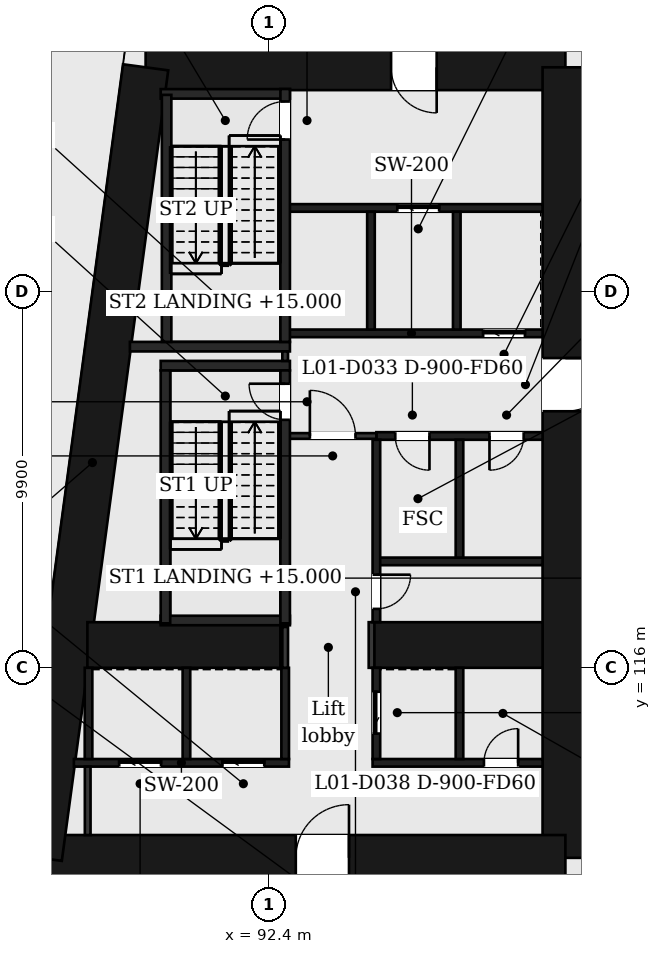
"""IFC4 building model, lengths in metres.
Left out: names, types, materials, properties, quantities, classifications, styles, units other than length and angle.
Written with IfcOpenShell. Run it as: python <this file> out.ifc"""

import sys

from ifc_helpers import new_model, si_unit, direction, frame, frame_2d, origin, place, context, subcontext, project, spatial, rectangle, extrude, element, fill, save


model = new_model("IFC4")
c1 = context("Model", 3, precision=1e-05, world=origin(), true_north=direction((0.0, 1.0)))
c2 = subcontext(c1, "Body", "Model", "MODEL_VIEW")
j1 = project(units=[si_unit("LENGTHUNIT", "METRE"), si_unit("PLANEANGLEUNIT", "RADIAN")], contexts=[c1])
p1 = place(None, origin())
s1 = spatial("IfcSite", under=j1, at=p1, CompositionType="ELEMENT")
p2 = place(p1, origin())
s2 = spatial("IfcBuilding", under=s1, at=p2, CompositionType="ELEMENT")
p3 = place(p2, frame((0.0, 0.0, 9.0)))
s3 = spatial("IfcBuildingStorey", under=s2, at=p3, CompositionType="ELEMENT", Elevation=9.0)
p4 = place(p3, frame((89.156, 131.8, 0.0), z_axis=(0.0, 0.0, 1.0), x_axis=(1.0, 0.0, 0.0)))
e1 = element("IfcWall", 1, at=p4, inside=s3, PredefinedType="SHEAR", context=c2, shape_type="SweptSolid", body=[
    extrude(rectangle(XDim=11.044, YDim=1.2, at=frame_2d((5.522, 0.0))), origin(), (0.0, 0.0, 1.0), 8.0),
])
p5 = place(p4, frame((6.458, 0.0, 0.0)))
e2 = element("IfcOpeningElement", 2, at=p5, cuts=e1, PredefinedType="OPENING", context=c2, shape_type="SweptSolid", body=[
    extrude(rectangle(XDim=1.2, YDim=2.1, at=frame_2d((0.6, 1.05))), frame((0.0, 0.61, 0.0), z_axis=(0.0, -1.0, 0.0), x_axis=(1.0, 0.0, 0.0)), (0.0, 0.0, 1.0), 1.22),
])
p6 = place(p3, frame((100.2, 131.8, 0.0), z_axis=(0.0, 0.0, 1.0), x_axis=(0.0, -1.0, 0.0)))
e3 = element("IfcWall", 3, at=p6, inside=s3, PredefinedType="SHEAR", context=c2, shape_type="SweptSolid", body=[
    extrude(rectangle(XDim=20.8, YDim=1.2, at=frame_2d((10.4, 0.0))), origin(), (0.0, 0.0, 1.0), 8.0),
])
p7 = place(p6, frame((7.65, 0.0, 0.0)))
e4 = element("IfcOpeningElement", 4, at=p7, cuts=e3, PredefinedType="OPENING", context=c2, shape_type="SweptSolid", body=[
    extrude(rectangle(XDim=1.4, YDim=2.1, at=frame_2d((0.7, 1.05))), frame((0.0, 0.61, 0.0), z_axis=(0.0, -1.0, 0.0), x_axis=(1.0, 0.0, 0.0)), (0.0, 0.0, 1.0), 1.22),
])
p8 = place(p3, frame((100.2, 111.0, 0.0), z_axis=(0.0, 0.0, 1.0), x_axis=(-1.0, 0.0, 0.0)))
e5 = element("IfcWall", 5, at=p8, inside=s3, PredefinedType="SHEAR", context=c2, shape_type="SweptSolid", body=[
    extrude(rectangle(XDim=13.844, YDim=1.2, at=frame_2d((6.922, 0.0))), origin(), (0.0, 0.0, 1.0), 8.0),
])
p9 = place(p8, frame((5.694, 0.0, 0.0)))
e6 = element("IfcOpeningElement", 6, at=p9, cuts=e5, PredefinedType="OPENING", context=c2, shape_type="SweptSolid", body=[
    extrude(rectangle(XDim=1.4, YDim=2.1, at=frame_2d((0.7, 1.05))), frame((0.0, 0.61, 0.0), z_axis=(0.0, -1.0, 0.0), x_axis=(1.0, 0.0, 0.0)), (0.0, 0.0, 1.0), 1.22),
])
p10 = place(p3, frame((86.355, 111.0, 0.0), z_axis=(0.0, 0.0, 1.0), x_axis=(0.133413989637, 0.99106039542, 0.0)))
e7 = element("IfcWall", 7, at=p10, inside=s3, PredefinedType="SHEAR", context=c2, shape_type="SweptSolid", body=[
    extrude(rectangle(XDim=20.988, YDim=1.2, at=frame_2d((10.494, 0.0))), origin(), (0.0, 0.0, 1.0), 8.0),
])
p11 = place(p3, frame((87.623, 116.6, 0.0), z_axis=(0.0, 0.0, 1.0), x_axis=(1.0, 0.0, 0.0)))
e8 = element("IfcWall", 8, at=p11, inside=s3, PredefinedType="SHEAR", context=c2, shape_type="SweptSolid", body=[
    extrude(rectangle(XDim=5.077, YDim=1.2, at=frame_2d((2.539, 0.0))), origin(), (0.0, 0.0, 1.0), 8.0),
])
p12 = place(p3, frame((95.1, 116.6, 0.0), z_axis=(0.0, 0.0, 1.0), x_axis=(1.0, 0.0, 0.0)))
e9 = element("IfcWall", 9, at=p12, inside=s3, PredefinedType="SHEAR", context=c2, shape_type="SweptSolid", body=[
    extrude(rectangle(XDim=4.5, YDim=1.2, at=frame_2d((2.25, 0.0))), origin(), (0.0, 0.0, 1.0), 8.0),
])
p13 = place(p3, frame((87.267, 113.5, 0.0), z_axis=(0.0, 0.0, 1.0), x_axis=(1.0, 0.0, 0.0)))
e10 = element("IfcWall", 10, at=p13, inside=s3, PredefinedType="PARTITIONING", context=c2, shape_type="SweptSolid", body=[
    extrude(rectangle(XDim=5.66, YDim=0.2, at=frame_2d((2.83, 0.0))), origin(), (0.0, 0.0, 1.0), 7.5),
])
p14 = place(p13, frame((1.193, 0.0, 0.0)))
e11 = element("IfcOpeningElement", 11, at=p14, cuts=e10, PredefinedType="OPENING", context=c2, shape_type="SweptSolid", body=[
    extrude(rectangle(XDim=1.1, YDim=2.1, at=frame_2d((0.55, 1.05))), frame((0.0, 0.11, 0.0), z_axis=(0.0, -1.0, 0.0), x_axis=(1.0, 0.0, 0.0)), (0.0, 0.0, 1.0), 0.22),
])
p15 = place(p13, frame((3.91, 0.0, 0.0)))
e12 = element("IfcOpeningElement", 12, at=p15, cuts=e10, PredefinedType="OPENING", context=c2, shape_type="SweptSolid", body=[
    extrude(rectangle(XDim=1.1, YDim=2.1, at=frame_2d((0.55, 1.05))), frame((0.0, 0.11, 0.0), z_axis=(0.0, -1.0, 0.0), x_axis=(1.0, 0.0, 0.0)), (0.0, 0.0, 1.0), 0.22),
])
p16 = place(p3, frame((95.127, 113.5, 0.0), z_axis=(0.0, 0.0, 1.0), x_axis=(1.0, 0.0, 0.0)))
e13 = element("IfcWall", 13, at=p16, inside=s3, PredefinedType="PARTITIONING", context=c2, shape_type="SweptSolid", body=[
    extrude(rectangle(XDim=4.473, YDim=0.2, at=frame_2d((2.237, 0.0))), origin(), (0.0, 0.0, 1.0), 7.5),
])
p17 = place(p16, frame((2.93, 0.0, 0.0)))
e14 = element("IfcOpeningElement", 14, at=p17, cuts=e13, PredefinedType="OPENING", context=c2, shape_type="SweptSolid", body=[
    extrude(rectangle(XDim=0.9, YDim=2.1, at=frame_2d((0.45, 1.05))), frame((0.0, 0.11, 0.0), z_axis=(0.0, -1.0, 0.0), x_axis=(1.0, 0.0, 0.0)), (0.0, 0.0, 1.0), 0.22),
])
p18 = place(p3, frame((89.552, 117.245, 0.0), z_axis=(0.0, 0.0, 1.0), x_axis=(1.0, 0.0, 0.0)))
e15 = element("IfcWall", 15, at=p18, inside=s3, PredefinedType="PARTITIONING", context=c2, shape_type="SweptSolid", body=[
    extrude(rectangle(XDim=3.4, YDim=0.25, at=frame_2d((1.7, 0.0))), origin(), (0.0, 0.0, 1.0), 7.5),
])
p19 = place(p3, frame((95.227, 118.8, 0.0), z_axis=(0.0, 0.0, 1.0), x_axis=(1.0, 0.0, 0.0)))
e16 = element("IfcWall", 16, at=p19, inside=s3, PredefinedType="PARTITIONING", context=c2, shape_type="SweptSolid", body=[
    extrude(rectangle(XDim=4.373, YDim=0.2, at=frame_2d((2.187, 0.0))), origin(), (0.0, 0.0, 1.0), 7.5),
])
p20 = place(p3, frame((95.227, 122.1, 0.0), z_axis=(0.0, 0.0, 1.0), x_axis=(1.0, 0.0, 0.0)))
e17 = element("IfcWall", 17, at=p20, inside=s3, PredefinedType="PARTITIONING", context=c2, shape_type="SweptSolid", body=[
    extrude(rectangle(XDim=4.373, YDim=0.2, at=frame_2d((2.187, 0.0))), origin(), (0.0, 0.0, 1.0), 7.5),
])
p21 = place(p20, frame((0.497, 0.0, 0.0)))
e18 = element("IfcOpeningElement", 18, at=p21, cuts=e17, PredefinedType="OPENING", context=c2, shape_type="SweptSolid", body=[
    extrude(rectangle(XDim=0.9, YDim=2.1, at=frame_2d((0.45, 1.05))), frame((0.0, 0.11, 0.0), z_axis=(0.0, -1.0, 0.0), x_axis=(1.0, 0.0, 0.0)), (0.0, 0.0, 1.0), 0.22),
])
p22 = place(p20, frame((2.976, 0.0, 0.0)))
e19 = element("IfcOpeningElement", 19, at=p22, cuts=e17, PredefinedType="OPENING", context=c2, shape_type="SweptSolid", body=[
    extrude(rectangle(XDim=0.9, YDim=2.1, at=frame_2d((0.45, 1.05))), frame((0.0, 0.11, 0.0), z_axis=(0.0, -1.0, 0.0), x_axis=(1.0, 0.0, 0.0)), (0.0, 0.0, 1.0), 0.22),
])
p23 = place(p3, frame((92.827, 122.1, 0.0), z_axis=(0.0, 0.0, 1.0), x_axis=(1.0, 0.0, 0.0)))
e20 = element("IfcWall", 20, at=p23, inside=s3, PredefinedType="PARTITIONING", context=c2, shape_type="SweptSolid", body=[
    extrude(rectangle(XDim=2.4, YDim=0.15, at=frame_2d((1.2, 0.0))), origin(), (0.0, 0.0, 1.0), 7.5),
])
p24 = place(p23, frame((0.65, 0.0, 0.0)))
e21 = element("IfcOpeningElement", 21, at=p24, cuts=e20, PredefinedType="OPENING", context=c2, shape_type="SweptSolid", body=[
    extrude(rectangle(XDim=1.2, YDim=2.1, at=frame_2d((0.6, 1.05))), frame((0.0, 0.085, 0.0), z_axis=(0.0, -1.0, 0.0), x_axis=(1.0, 0.0, 0.0)), (0.0, 0.0, 1.0), 0.17),
])
p25 = place(p3, frame((89.552, 123.95, 0.0), z_axis=(0.0, 0.0, 1.0), x_axis=(1.0, 0.0, 0.0)))
e22 = element("IfcWall", 22, at=p25, inside=s3, PredefinedType="PARTITIONING", context=c2, shape_type="SweptSolid", body=[
    extrude(rectangle(XDim=3.4, YDim=0.25, at=frame_2d((1.7, 0.0))), origin(), (0.0, 0.0, 1.0), 7.5),
])
p26 = place(p3, frame((88.741, 124.45, 0.0), z_axis=(0.0, 0.0, 1.0), x_axis=(1.0, 0.0, 0.0)))
e23 = element("IfcWall", 23, at=p26, inside=s3, PredefinedType="PARTITIONING", context=c2, shape_type="SweptSolid", body=[
    extrude(rectangle(XDim=4.21, YDim=0.25, at=frame_2d((2.105, 0.0))), origin(), (0.0, 0.0, 1.0), 7.5),
])
p27 = place(p3, frame((92.702, 124.8, 0.0), z_axis=(0.0, 0.0, 1.0), x_axis=(1.0, 0.0, 0.0)))
e24 = element("IfcWall", 24, at=p27, inside=s3, PredefinedType="PARTITIONING", context=c2, shape_type="SweptSolid", body=[
    extrude(rectangle(XDim=6.898, YDim=0.2, at=frame_2d((3.449, 0.0))), origin(), (0.0, 0.0, 1.0), 7.5),
])
p28 = place(p27, frame((5.334, 0.0, 0.0)))
e25 = element("IfcOpeningElement", 25, at=p28, cuts=e24, PredefinedType="OPENING", context=c2, shape_type="SweptSolid", body=[
    extrude(rectangle(XDim=1.1, YDim=2.1, at=frame_2d((0.55, 1.05))), frame((0.0, 0.11, 0.0), z_axis=(0.0, -1.0, 0.0), x_axis=(1.0, 0.0, 0.0)), (0.0, 0.0, 1.0), 0.22),
])
p29 = place(p3, frame((92.827, 128.1, 0.0), z_axis=(0.0, 0.0, 1.0), x_axis=(1.0, 0.0, 0.0)))
e26 = element("IfcWall", 26, at=p29, inside=s3, PredefinedType="PARTITIONING", context=c2, shape_type="SweptSolid", body=[
    extrude(rectangle(XDim=6.773, YDim=0.2, at=frame_2d((3.387, 0.0))), origin(), (0.0, 0.0, 1.0), 7.5),
])
p30 = place(p29, frame((2.951, 0.0, 0.0)))
e27 = element("IfcOpeningElement", 27, at=p30, cuts=e26, PredefinedType="OPENING", context=c2, shape_type="SweptSolid", body=[
    extrude(rectangle(XDim=1.1, YDim=2.1, at=frame_2d((0.55, 1.05))), frame((0.0, 0.11, 0.0), z_axis=(0.0, -1.0, 0.0), x_axis=(1.0, 0.0, 0.0)), (0.0, 0.0, 1.0), 0.22),
])
p31 = place(p3, frame((89.552, 131.101, 0.0), z_axis=(0.0, 0.0, 1.0), x_axis=(1.0, 0.0, 0.0)))
e28 = element("IfcWall", 28, at=p31, inside=s3, PredefinedType="PARTITIONING", context=c2, shape_type="SweptSolid", body=[
    extrude(rectangle(XDim=3.4, YDim=0.25, at=frame_2d((1.7, 0.0))), origin(), (0.0, 0.0, 1.0), 7.5),
])
p32 = place(p3, frame((87.653, 113.6, 0.0), z_axis=(0.0, 0.0, 1.0), x_axis=(0.0, 1.0, 0.0)))
e29 = element("IfcWall", 29, at=p32, inside=s3, PredefinedType="PARTITIONING", context=c2, shape_type="SweptSolid", body=[
    extrude(rectangle(XDim=2.4, YDim=0.2, at=frame_2d((1.2, 0.0))), origin(), (0.0, 0.0, 1.0), 7.5),
])
p33 = place(p3, frame((87.631, 111.6, 0.0), z_axis=(0.0, 0.0, 1.0), x_axis=(0.0, 1.0, 0.0)))
e30 = element("IfcWall", 30, at=p33, inside=s3, PredefinedType="PARTITIONING", context=c2, shape_type="SweptSolid", body=[
    extrude(rectangle(XDim=1.8, YDim=0.15, at=frame_2d((0.9, 0.0))), origin(), (0.0, 0.0, 1.0), 7.5),
])
p34 = place(p3, frame((89.677, 117.17, 0.0), z_axis=(0.0, 0.0, 1.0), x_axis=(0.0, 1.0, 0.0)))
e31 = element("IfcWall", 31, at=p34, inside=s3, PredefinedType="PARTITIONING", context=c2, shape_type="SweptSolid", body=[
    extrude(rectangle(XDim=6.655, YDim=0.25, at=frame_2d((3.328, 0.0))), origin(), (0.0, 0.0, 1.0), 7.5),
])
p35 = place(p3, frame((89.707, 124.575, 0.0), z_axis=(0.0, 0.0, 1.0), x_axis=(0.0, 1.0, 0.0)))
e32 = element("IfcWall", 32, at=p35, inside=s3, PredefinedType="PARTITIONING", context=c2, shape_type="SweptSolid", body=[
    extrude(rectangle(XDim=6.5, YDim=0.25, at=frame_2d((3.25, 0.0))), origin(), (0.0, 0.0, 1.0), 7.5),
])
for number, where, z_axis, x_axis in (
    (33, (90.229, 113.6, 0.0), (0.0, 0.0, 1.0), (0.0, 1.0, 0.0)),
    (34, (92.827, 113.6, 0.0), (0.0, 0.0, 1.0), (0.0, 1.0, 0.0)),
):
    element("IfcWall", number, at=place(p3, frame(where, z_axis=z_axis, x_axis=x_axis)), inside=s3, PredefinedType="PARTITIONING", context=c2, shape_type="SweptSolid", body=[
        extrude(rectangle(XDim=2.4, YDim=0.2, at=frame_2d((1.2, 0.0))), origin(), (0.0, 0.0, 1.0), 7.5),
    ])
p36 = place(p3, frame((92.827, 116.0, 0.0), z_axis=(0.0, 0.0, 1.0), x_axis=(0.0, 1.0, 0.0)))
e35 = element("IfcWall", 35, at=p36, inside=s3, PredefinedType="PARTITIONING", context=c2, shape_type="SweptSolid", body=[
    extrude(rectangle(XDim=1.075, YDim=0.15, at=frame_2d((0.538, 0.0))), origin(), (0.0, 0.0, 1.0), 7.5),
])
p37 = place(p3, frame((92.827, 124.075, 0.0), z_axis=(0.0, 0.0, 1.0), x_axis=(0.0, 1.0, 0.0)))
e36 = element("IfcWall", 36, at=p37, inside=s3, PredefinedType="PARTITIONING", context=c2, shape_type="SweptSolid", body=[
    extrude(rectangle(XDim=0.25, YDim=0.15, at=frame_2d((0.125, 0.0))), origin(), (0.0, 0.0, 1.0), 7.5),
])
p38 = place(p3, frame((92.827, 117.17, 0.0), z_axis=(0.0, 0.0, 1.0), x_axis=(0.0, 1.0, 0.0)))
e37 = element("IfcWall", 37, at=p38, inside=s3, PredefinedType="PARTITIONING", context=c2, shape_type="SweptSolid", body=[
    extrude(rectangle(XDim=6.655, YDim=0.25, at=frame_2d((3.328, 0.0))), origin(), (0.0, 0.0, 1.0), 7.5),
])
p39 = place(p38, frame((5.355, 0.0, 0.0)))
e38 = element("IfcOpeningElement", 38, at=p39, cuts=e37, PredefinedType="OPENING", context=c2, shape_type="SweptSolid", body=[
    extrude(rectangle(XDim=0.95, YDim=2.1, at=frame_2d((0.475, 1.05))), frame((0.0, 0.135, 0.0), z_axis=(0.0, -1.0, 0.0), x_axis=(1.0, 0.0, 0.0)), (0.0, 0.0, 1.0), 0.27),
])
p40 = place(p3, frame((92.827, 124.575, 0.0), z_axis=(0.0, 0.0, 1.0), x_axis=(0.0, 1.0, 0.0)))
e39 = element("IfcWall", 39, at=p40, inside=s3, PredefinedType="PARTITIONING", context=c2, shape_type="SweptSolid", body=[
    extrude(rectangle(XDim=6.655, YDim=0.25, at=frame_2d((3.328, 0.0))), origin(), (0.0, 0.0, 1.0), 7.5),
])
p41 = place(p40, frame((5.325, 0.0, 0.0)))
e40 = element("IfcOpeningElement", 40, at=p41, cuts=e39, PredefinedType="OPENING", context=c2, shape_type="SweptSolid", body=[
    extrude(rectangle(XDim=1.0, YDim=2.1, at=frame_2d((0.5, 1.05))), frame((0.0, 0.135, 0.0), z_axis=(0.0, -1.0, 0.0), x_axis=(1.0, 0.0, 0.0)), (0.0, 0.0, 1.0), 0.27),
])
p42 = place(p3, frame((95.085, 124.9, 0.0), z_axis=(0.0, 0.0, 1.0), x_axis=(0.0, 1.0, 0.0)))
e41 = element("IfcWall", 41, at=p42, inside=s3, PredefinedType="PARTITIONING", context=c2, shape_type="SweptSolid", body=[
    extrude(rectangle(XDim=3.1, YDim=0.2, at=frame_2d((1.55, 0.0))), origin(), (0.0, 0.0, 1.0), 7.5),
])
p43 = place(p3, frame((95.1, 116.0, 0.0), z_axis=(0.0, 0.0, 1.0), x_axis=(0.0, 1.0, 0.0)))
e42 = element("IfcWall", 42, at=p43, inside=s3, PredefinedType="PARTITIONING", context=c2, shape_type="SweptSolid", body=[
    extrude(rectangle(XDim=1.2, YDim=0.15, at=frame_2d((0.6, 0.0))), origin(), (0.0, 0.0, 1.0), 7.5),
])
p44 = place(p3, frame((95.227, 113.6, 0.0), z_axis=(0.0, 0.0, 1.0), x_axis=(0.0, 1.0, 0.0)))
e43 = element("IfcWall", 43, at=p44, inside=s3, PredefinedType="PARTITIONING", context=c2, shape_type="SweptSolid", body=[
    extrude(rectangle(XDim=2.4, YDim=0.2, at=frame_2d((1.2, 0.0))), origin(), (0.0, 0.0, 1.0), 7.5),
])
p45 = place(p44, frame((0.67, 0.0, 0.0)))
e44 = element("IfcOpeningElement", 44, at=p45, cuts=e43, PredefinedType="OPENING", context=c2, shape_type="SweptSolid", body=[
    extrude(rectangle(XDim=1.1, YDim=2.1, at=frame_2d((0.55, 1.05))), frame((0.0, 0.11, 0.0), z_axis=(0.0, -1.0, 0.0), x_axis=(1.0, 0.0, 0.0)), (0.0, 0.0, 1.0), 0.22),
])
p46 = place(p3, frame((95.227, 117.2, 0.0), z_axis=(0.0, 0.0, 1.0), x_axis=(0.0, 1.0, 0.0)))
e45 = element("IfcWall", 45, at=p46, inside=s3, PredefinedType="PARTITIONING", context=c2, shape_type="SweptSolid", body=[
    extrude(rectangle(XDim=4.8, YDim=0.2, at=frame_2d((2.4, 0.0))), origin(), (0.0, 0.0, 1.0), 7.5),
])
p47 = place(p46, frame((0.35, 0.0, 0.0)))
e46 = element("IfcOpeningElement", 46, at=p47, cuts=e45, PredefinedType="OPENING", context=c2, shape_type="SweptSolid", body=[
    extrude(rectangle(XDim=0.9, YDim=2.1, at=frame_2d((0.45, 1.05))), frame((0.0, 0.11, 0.0), z_axis=(0.0, -1.0, 0.0), x_axis=(1.0, 0.0, 0.0)), (0.0, 0.0, 1.0), 0.22),
])
p48 = place(p3, frame((97.342, 124.9, 0.0), z_axis=(0.0, 0.0, 1.0), x_axis=(0.0, 1.0, 0.0)))
e47 = element("IfcWall", 47, at=p48, inside=s3, PredefinedType="PARTITIONING", context=c2, shape_type="SweptSolid", body=[
    extrude(rectangle(XDim=3.1, YDim=0.2, at=frame_2d((1.55, 0.0))), origin(), (0.0, 0.0, 1.0), 7.5),
])
p49 = place(p3, frame((97.414, 113.6, 0.0), z_axis=(0.0, 0.0, 1.0), x_axis=(0.0, 1.0, 0.0)))
e48 = element("IfcWall", 48, at=p49, inside=s3, PredefinedType="PARTITIONING", context=c2, shape_type="SweptSolid", body=[
    extrude(rectangle(XDim=2.4, YDim=0.2, at=frame_2d((1.2, 0.0))), origin(), (0.0, 0.0, 1.0), 7.5),
])
p50 = place(p3, frame((97.414, 118.9, 0.0), z_axis=(0.0, 0.0, 1.0), x_axis=(0.0, 1.0, 0.0)))
e49 = element("IfcWall", 49, at=p50, inside=s3, PredefinedType="PARTITIONING", context=c2, shape_type="SweptSolid", body=[
    extrude(rectangle(XDim=3.1, YDim=0.2, at=frame_2d((1.55, 0.0))), origin(), (0.0, 0.0, 1.0), 7.5),
])
p51 = place(p24, origin())
e50 = element("IfcDoor", 50, at=p51, inside=s3, OperationType="SINGLE_SWING_LEFT", PredefinedType="DOOR", context=c2, shape_type="SweptSolid", body=[
    extrude(rectangle(XDim=1.2, YDim=2.1, at=frame_2d((0.6, 1.05))), frame((0.0, 0.025, 0.0), z_axis=(0.0, -1.0, 0.0), x_axis=(1.0, 0.0, 0.0)), (0.0, 0.0, 1.0), 0.05),
])
fill(e21, e50)
p52 = place(p30, origin())
e51 = element("IfcDoor", 51, at=p52, inside=s3, OperationType="SLIDING_TO_LEFT", PredefinedType="DOOR", context=c2, shape_type="SweptSolid", body=[
    extrude(rectangle(XDim=1.1, YDim=2.1, at=frame_2d((0.55, 1.05))), frame((0.0, 0.025, 0.0), z_axis=(0.0, -1.0, 0.0), x_axis=(1.0, 0.0, 0.0)), (0.0, 0.0, 1.0), 0.05),
])
fill(e27, e51)
p53 = place(p28, origin())
e52 = element("IfcDoor", 52, at=p53, inside=s3, OperationType="SLIDING_TO_LEFT", PredefinedType="DOOR", context=c2, shape_type="SweptSolid", body=[
    extrude(rectangle(XDim=1.1, YDim=2.1, at=frame_2d((0.55, 1.05))), frame((0.0, 0.025, 0.0), z_axis=(0.0, -1.0, 0.0), x_axis=(1.0, 0.0, 0.0)), (0.0, 0.0, 1.0), 0.05),
])
fill(e25, e52)
p54 = place(p21, origin())
e53 = element("IfcDoor", 53, at=p54, inside=s3, OperationType="SINGLE_SWING_RIGHT", PredefinedType="DOOR", context=c2, shape_type="SweptSolid", body=[
    extrude(rectangle(XDim=0.9, YDim=2.1, at=frame_2d((0.45, 1.05))), frame((0.0, 0.025, 0.0), z_axis=(0.0, -1.0, 0.0), x_axis=(1.0, 0.0, 0.0)), (0.0, 0.0, 1.0), 0.05),
])
fill(e18, e53)
p55 = place(p22, origin())
e54 = element("IfcDoor", 54, at=p55, inside=s3, OperationType="SINGLE_SWING_LEFT", PredefinedType="DOOR", context=c2, shape_type="SweptSolid", body=[
    extrude(rectangle(XDim=0.9, YDim=2.1, at=frame_2d((0.45, 1.05))), frame((0.0, 0.025, 0.0), z_axis=(0.0, -1.0, 0.0), x_axis=(1.0, 0.0, 0.0)), (0.0, 0.0, 1.0), 0.05),
])
fill(e19, e54)
p56 = place(p39, origin())
e55 = element("IfcDoor", 55, at=p56, inside=s3, OperationType="SINGLE_SWING_RIGHT", PredefinedType="DOOR", context=c2, shape_type="SweptSolid", body=[
    extrude(rectangle(XDim=0.95, YDim=2.1, at=frame_2d((0.475, 1.05))), frame((0.0, 0.025, 0.0), z_axis=(0.0, -1.0, 0.0), x_axis=(1.0, 0.0, 0.0)), (0.0, 0.0, 1.0), 0.05),
])
fill(e38, e55)
p57 = place(p41, origin())
e56 = element("IfcDoor", 56, at=p57, inside=s3, OperationType="SINGLE_SWING_LEFT", PredefinedType="DOOR", context=c2, shape_type="SweptSolid", body=[
    extrude(rectangle(XDim=1.0, YDim=2.1, at=frame_2d((0.5, 1.05))), frame((0.0, 0.025, 0.0), z_axis=(0.0, -1.0, 0.0), x_axis=(1.0, 0.0, 0.0)), (0.0, 0.0, 1.0), 0.05),
])
fill(e40, e56)
p58 = place(p47, origin())
e57 = element("IfcDoor", 57, at=p58, inside=s3, OperationType="SINGLE_SWING_RIGHT", PredefinedType="DOOR", context=c2, shape_type="SweptSolid", body=[
    extrude(rectangle(XDim=0.9, YDim=2.1, at=frame_2d((0.45, 1.05))), frame((0.0, 0.025, 0.0), z_axis=(0.0, -1.0, 0.0), x_axis=(1.0, 0.0, 0.0)), (0.0, 0.0, 1.0), 0.05),
])
fill(e46, e57)
p59 = place(p14, origin())
e58 = element("IfcDoor", 58, at=p59, inside=s3, OperationType="SLIDING_TO_LEFT", PredefinedType="DOOR", context=c2, shape_type="SweptSolid", body=[
    extrude(rectangle(XDim=1.1, YDim=2.1, at=frame_2d((0.55, 1.05))), frame((0.0, 0.025, 0.0), z_axis=(0.0, -1.0, 0.0), x_axis=(1.0, 0.0, 0.0)), (0.0, 0.0, 1.0), 0.05),
])
fill(e11, e58)
p60 = place(p15, origin())
e59 = element("IfcDoor", 59, at=p60, inside=s3, OperationType="SLIDING_TO_LEFT", PredefinedType="DOOR", context=c2, shape_type="SweptSolid", body=[
    extrude(rectangle(XDim=1.1, YDim=2.1, at=frame_2d((0.55, 1.05))), frame((0.0, 0.025, 0.0), z_axis=(0.0, -1.0, 0.0), x_axis=(1.0, 0.0, 0.0)), (0.0, 0.0, 1.0), 0.05),
])
fill(e12, e59)
p61 = place(p45, origin())
e60 = element("IfcDoor", 60, at=p61, inside=s3, OperationType="SLIDING_TO_LEFT", PredefinedType="DOOR", context=c2, shape_type="SweptSolid", body=[
    extrude(rectangle(XDim=1.1, YDim=2.1, at=frame_2d((0.55, 1.05))), frame((0.0, 0.025, 0.0), z_axis=(0.0, -1.0, 0.0), x_axis=(1.0, 0.0, 0.0)), (0.0, 0.0, 1.0), 0.05),
])
fill(e44, e60)
p62 = place(p17, origin())
e61 = element("IfcDoor", 61, at=p62, inside=s3, OperationType="SINGLE_SWING_RIGHT", PredefinedType="DOOR", context=c2, shape_type="SweptSolid", body=[
    extrude(rectangle(XDim=0.9, YDim=2.1, at=frame_2d((0.45, 1.05))), frame((0.0, 0.025, 0.0), z_axis=(0.0, -1.0, 0.0), x_axis=(1.0, 0.0, 0.0)), (0.0, 0.0, 1.0), 0.05),
])
fill(e14, e61)
p63 = place(p9, origin())
e62 = element("IfcDoor", 62, at=p63, inside=s3, OperationType="SINGLE_SWING_LEFT", PredefinedType="DOOR", context=c2, shape_type="SweptSolid", body=[
    extrude(rectangle(XDim=1.4, YDim=2.1, at=frame_2d((0.7, 1.05))), frame((0.0, 0.025, 0.0), z_axis=(0.0, -1.0, 0.0), x_axis=(1.0, 0.0, 0.0)), (0.0, 0.0, 1.0), 0.05),
])
fill(e6, e62)
p64 = place(p5, origin())
e63 = element("IfcDoor", 63, at=p64, inside=s3, OperationType="SINGLE_SWING_RIGHT", PredefinedType="DOOR", context=c2, shape_type="SweptSolid", body=[
    extrude(rectangle(XDim=1.2, YDim=2.1, at=frame_2d((0.6, 1.05))), frame((0.0, 0.025, 0.0), z_axis=(0.0, -1.0, 0.0), x_axis=(1.0, 0.0, 0.0)), (0.0, 0.0, 1.0), 0.05),
])
fill(e2, e63)
p65 = place(p7, origin())
e64 = element("IfcDoor", 64, at=p65, inside=s3, OperationType="SINGLE_SWING_LEFT", PredefinedType="DOOR", context=c2, shape_type="SweptSolid", body=[
    extrude(rectangle(XDim=1.4, YDim=2.1, at=frame_2d((0.7, 1.05))), frame((0.0, 0.025, 0.0), z_axis=(0.0, -1.0, 0.0), x_axis=(1.0, 0.0, 0.0)), (0.0, 0.0, 1.0), 0.05),
])
fill(e4, e64)
save(model, sys.argv[1])
